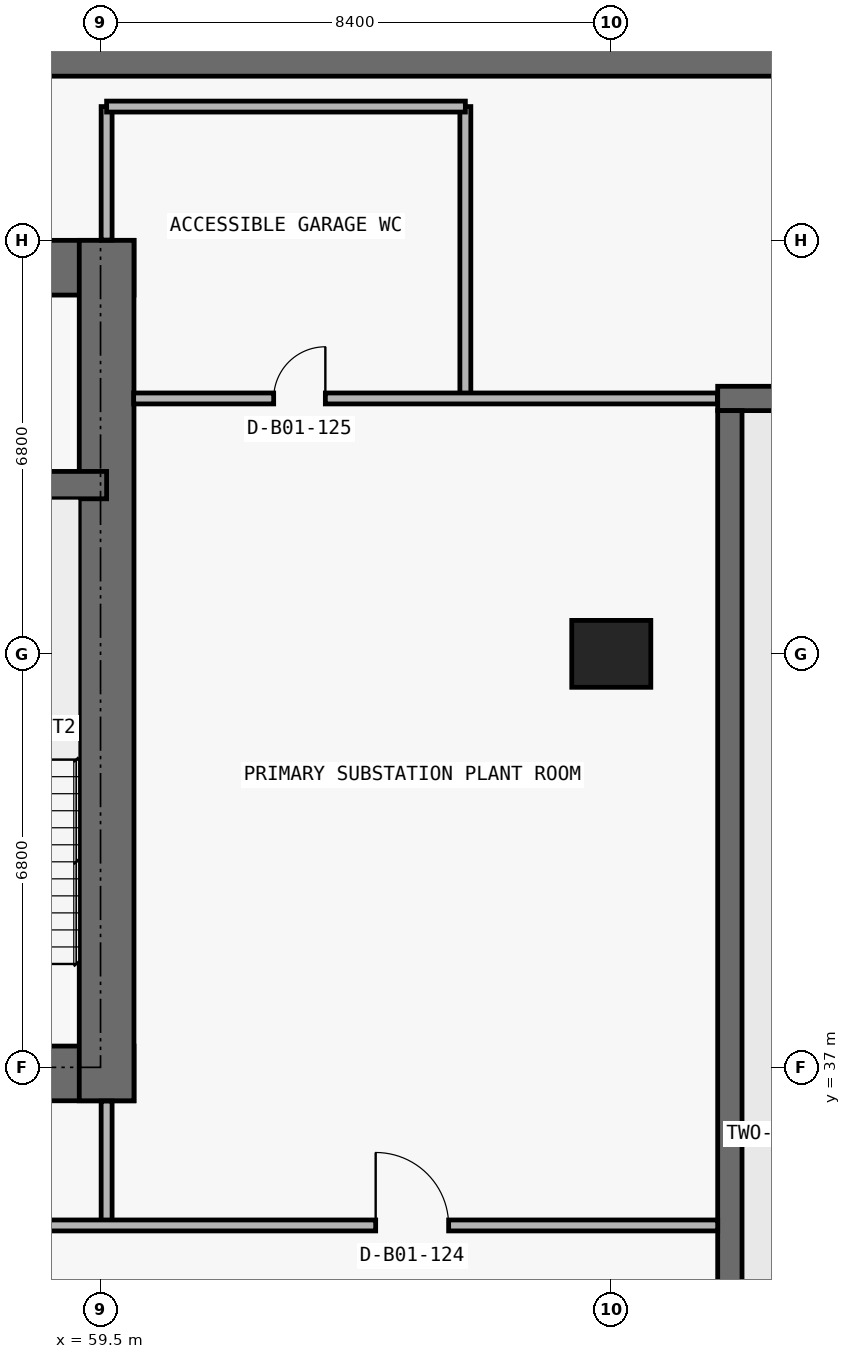
"""IFC4 building model, lengths in metres.
Left out: names, types, materials, properties, quantities, classifications, styles, units other than length and angle.
Written with IfcOpenShell. Run it as: python <this file> out.ifc"""

import sys

from ifc_helpers import new_model, si_unit, direction, frame, frame_2d, origin, origin_2d, place, context, subcontext, project, spatial, rectangle, extrude, element, fill, save


model = new_model("IFC4")
c1 = context("Model", 3, precision=1e-05, world=origin(), true_north=direction((0.0, 1.0)))
c2 = subcontext(c1, "Body", "Model", "MODEL_VIEW")
j1 = project(units=[si_unit("LENGTHUNIT", "METRE"), si_unit("PLANEANGLEUNIT", "RADIAN")], contexts=[c1])
p1 = place(None, origin())
s1 = spatial("IfcSite", under=j1, at=p1, CompositionType="ELEMENT")
p2 = place(p1, origin())
s2 = spatial("IfcBuilding", under=s1, at=p2, CompositionType="ELEMENT")
p3 = place(p2, frame((0.0, 0.0, -4.5)))
s3 = spatial("IfcBuildingStorey", under=s2, at=p3, CompositionType="ELEMENT", Elevation=-4.5)
p4 = place(p3, frame((0.0, 53.55, 0.0), z_axis=(0.0, 0.0, 1.0), x_axis=(1.0, 0.0, 0.0)))
e1 = element("IfcWall", 1, at=p4, inside=s3, PredefinedType="SOLIDWALL", context=c2, shape_type="SweptSolid", body=[
    extrude(rectangle(XDim=77.8, YDim=0.5, at=frame_2d((38.9, 0.0))), origin(), (0.0, 0.0, 1.0), 4.2),
])
p5 = place(p3, frame((69.65, 48.0, 0.0), z_axis=(0.0, 0.0, 1.0), x_axis=(1.0, 0.0, 0.0)))
e2 = element("IfcWall", 2, at=p5, inside=s3, PredefinedType="SHEAR", context=c2, shape_type="SweptSolid", body=[
    extrude(rectangle(XDim=6.4, YDim=0.4, at=frame_2d((3.2, 0.0))), origin(), (0.0, 0.0, 1.0), 4.2),
])
p6 = place(p3, frame((69.85, 23.6, 0.0), z_axis=(0.0, 0.0, 1.0), x_axis=(0.0, 1.0, 0.0)))
e3 = element("IfcWall", 3, at=p6, inside=s3, PredefinedType="SHEAR", context=c2, shape_type="SweptSolid", body=[
    extrude(rectangle(XDim=24.2, YDim=0.4, at=frame_2d((12.1, 0.0))), origin(), (0.0, 0.0, 1.0), 4.2),
])
p7 = place(p3, frame((67.9, 43.8, 0.0), z_axis=(0.0, 0.0, 1.0), x_axis=(1.0, 0.0, 0.0)))
e4 = element("IfcColumn", 4, at=p7, inside=s3, PredefinedType="COLUMN", context=c2, shape_type="SweptSolid", body=[
    extrude(rectangle(XDim=1.3, YDim=1.1, at=origin_2d()), origin(), (0.0, 0.0, 1.0), 4.2),
])
p8 = place(p3, frame((17.75, 36.9, 0.0), z_axis=(0.0, 0.0, 1.0), x_axis=(1.0, 0.0, 0.0)))
e5 = element("IfcWall", 5, at=p8, inside=s3, PredefinedType="SHEAR", context=c2, shape_type="SweptSolid", body=[
    extrude(rectangle(XDim=42.3, YDim=0.9, at=frame_2d((21.15, 0.0))), origin(), (0.0, 0.0, 1.0), 4.2),
])
p9 = place(p8, frame((14.55, 0.0, 0.0)))
e6 = element("IfcOpeningElement", 6, at=p9, cuts=e5, PredefinedType="OPENING", context=c2, shape_type="SweptSolid", body=[
    extrude(rectangle(XDim=1.1, YDim=2.15, at=frame_2d((0.55, 1.075))), frame((0.0, 0.46, 0.0), z_axis=(0.0, -1.0, 0.0), x_axis=(1.0, 0.0, 0.0)), (0.0, 0.0, 1.0), 0.92),
])
p10 = place(p8, frame((6.4, 0.0, 0.0)))
e7 = element("IfcOpeningElement", 7, at=p10, cuts=e5, PredefinedType="OPENING", context=c2, shape_type="SweptSolid", body=[
    extrude(rectangle(XDim=1.05, YDim=2.15, at=frame_2d((0.525, 1.075))), frame((0.0, 0.46, 0.0), z_axis=(0.0, -1.0, 0.0), x_axis=(1.0, 0.0, 0.0)), (0.0, 0.0, 1.0), 0.92),
])
p11 = place(p8, frame((34.9, 0.0, 0.0)))
e8 = element("IfcOpeningElement", 8, at=p11, cuts=e5, PredefinedType="OPENING", context=c2, shape_type="SweptSolid", body=[
    extrude(rectangle(XDim=1.05, YDim=2.15, at=frame_2d((0.525, 1.075))), frame((0.0, 0.46, 0.0), z_axis=(0.0, -1.0, 0.0), x_axis=(1.0, 0.0, 0.0)), (0.0, 0.0, 1.0), 0.92),
])
p12 = place(p8, frame((11.012, 0.0, 0.0)))
e9 = element("IfcOpeningElement", 9, at=p12, cuts=e5, PredefinedType="OPENING", context=c2, shape_type="SweptSolid", body=[
    extrude(rectangle(XDim=1.05, YDim=2.15, at=frame_2d((0.525, 1.075))), frame((0.0, 0.46, 0.0), z_axis=(0.0, -1.0, 0.0), x_axis=(1.0, 0.0, 0.0)), (0.0, 0.0, 1.0), 0.92),
])
p13 = place(p8, frame((24.25, 0.0, 0.0)))
e10 = element("IfcOpeningElement", 10, at=p13, cuts=e5, PredefinedType="OPENING", context=c2, shape_type="SweptSolid", body=[
    extrude(rectangle(XDim=1.05, YDim=2.15, at=frame_2d((0.525, 1.075))), frame((0.0, 0.46, 0.0), z_axis=(0.0, -1.0, 0.0), x_axis=(1.0, 0.0, 0.0)), (0.0, 0.0, 1.0), 0.92),
])
p14 = place(p3, frame((17.75, 50.15, 0.0), z_axis=(0.0, 0.0, 1.0), x_axis=(1.0, 0.0, 0.0)))
e11 = element("IfcWall", 11, at=p14, inside=s3, PredefinedType="SHEAR", context=c2, shape_type="SweptSolid", body=[
    extrude(rectangle(XDim=42.3, YDim=0.9, at=frame_2d((21.15, 0.0))), origin(), (0.0, 0.0, 1.0), 4.2),
])
p15 = place(p3, frame((59.6, 36.45, 0.0), z_axis=(0.0, 0.0, 1.0), x_axis=(0.0, 1.0, 0.0)))
e12 = element("IfcWall", 12, at=p15, inside=s3, PredefinedType="SHEAR", context=c2, shape_type="SweptSolid", body=[
    extrude(rectangle(XDim=14.15, YDim=0.9, at=frame_2d((7.075, 0.0))), origin(), (0.0, 0.0, 1.0), 4.2),
])
p16 = place(p3, frame((18.2, 46.575, 0.0), z_axis=(0.0, 0.0, 1.0), x_axis=(1.0, 0.0, 0.0)))
e13 = element("IfcWall", 13, at=p16, inside=s3, PredefinedType="SHEAR", context=c2, shape_type="SweptSolid", body=[
    extrude(rectangle(XDim=41.4, YDim=0.45, at=frame_2d((20.7, 0.0))), origin(), (0.0, 0.0, 1.0), 4.2),
])
p17 = place(p16, frame((7.675, 0.0, 0.0)))
e14 = element("IfcOpeningElement", 14, at=p17, cuts=e13, PredefinedType="OPENING", context=c2, shape_type="SweptSolid", body=[
    extrude(rectangle(XDim=1.05, YDim=2.15, at=frame_2d((0.525, 1.075))), frame((0.0, 0.235, 0.0), z_axis=(0.0, -1.0, 0.0), x_axis=(1.0, 0.0, 0.0)), (0.0, 0.0, 1.0), 0.47),
])
p18 = place(p16, frame((32.725, 0.0, 0.0)))
e15 = element("IfcOpeningElement", 15, at=p18, cuts=e13, PredefinedType="OPENING", context=c2, shape_type="SweptSolid", body=[
    extrude(rectangle(XDim=1.05, YDim=2.15, at=frame_2d((0.525, 1.075))), frame((0.0, 0.235, 0.0), z_axis=(0.0, -1.0, 0.0), x_axis=(1.0, 0.0, 0.0)), (0.0, 0.0, 1.0), 0.47),
])
p19 = place(p3, frame((59.6, 34.4, 0.0), z_axis=(0.0, 0.0, 1.0), x_axis=(0.0, 1.0, 0.0)))
e16 = element("IfcWall", 16, at=p19, inside=s3, PredefinedType="PARTITIONING", context=c2, shape_type="SweptSolid", body=[
    extrude(rectangle(XDim=2.045, YDim=0.18, at=frame_2d((1.022, 0.0))), origin(), (0.0, 0.0, 1.0), 3.085),
])
p20 = place(p3, frame((59.6, 50.605, 0.0), z_axis=(0.0, 0.0, 1.0), x_axis=(0.0, 1.0, 0.0)))
e17 = element("IfcWall", 17, at=p20, inside=s3, PredefinedType="PARTITIONING", context=c2, shape_type="SweptSolid", body=[
    extrude(rectangle(XDim=2.195, YDim=0.18, at=frame_2d((1.098, 0.0))), origin(), (0.0, 0.0, 1.0), 4.2),
])
p21 = place(p3, frame((65.5, 48.0, 0.0), z_axis=(0.0, 0.0, 1.0), x_axis=(0.0, 1.0, 0.0)))
e18 = element("IfcWall", 18, at=p21, inside=s3, PredefinedType="PARTITIONING", context=c2, shape_type="SweptSolid", body=[
    extrude(rectangle(XDim=4.8, YDim=0.18, at=frame_2d((2.4, 0.0))), origin(), (0.0, 0.0, 1.0), 4.2),
])
p22 = place(p3, frame((8.15, 34.4, 0.0), z_axis=(0.0, 0.0, 1.0), x_axis=(1.0, 0.0, 0.0)))
e19 = element("IfcWall", 19, at=p22, inside=s3, PredefinedType="PARTITIONING", context=c2, shape_type="SweptSolid", body=[
    extrude(rectangle(XDim=61.5, YDim=0.18, at=frame_2d((30.75, 0.0))), origin(), (0.0, 0.0, 1.0), 4.2),
])
p23 = place(p22, frame((30.15, 0.0, 0.0)))
e20 = element("IfcOpeningElement", 20, at=p23, cuts=e19, PredefinedType="OPENING", context=c2, shape_type="SweptSolid", body=[
    extrude(rectangle(XDim=1.2, YDim=2.2, at=frame_2d((0.6, 1.1))), frame((0.0, 0.1, 0.0), z_axis=(0.0, -1.0, 0.0), x_axis=(1.0, 0.0, 0.0)), (0.0, 0.0, 1.0), 0.2),
])
p24 = place(p22, frame((4.425, 0.0, 0.0)))
e21 = element("IfcOpeningElement", 21, at=p24, cuts=e19, PredefinedType="OPENING", context=c2, shape_type="SweptSolid", body=[
    extrude(rectangle(XDim=1.2, YDim=2.2, at=frame_2d((0.6, 1.1))), frame((0.0, 0.1, 0.0), z_axis=(0.0, -1.0, 0.0), x_axis=(1.0, 0.0, 0.0)), (0.0, 0.0, 1.0), 0.2),
])
p25 = place(p22, frame((55.875, 0.0, 0.0)))
e22 = element("IfcOpeningElement", 22, at=p25, cuts=e19, PredefinedType="OPENING", context=c2, shape_type="SweptSolid", body=[
    extrude(rectangle(XDim=1.2, YDim=2.2, at=frame_2d((0.6, 1.1))), frame((0.0, 0.1, 0.0), z_axis=(0.0, -1.0, 0.0), x_axis=(1.0, 0.0, 0.0)), (0.0, 0.0, 1.0), 0.2),
])
p26 = place(p3, frame((60.045, 48.0, 0.0), z_axis=(0.0, 0.0, 1.0), x_axis=(1.0, 0.0, 0.0)))
e23 = element("IfcWall", 23, at=p26, inside=s3, PredefinedType="PARTITIONING", context=c2, shape_type="SweptSolid", body=[
    extrude(rectangle(XDim=9.6, YDim=0.18, at=frame_2d((4.8, 0.0))), origin(), (0.0, 0.0, 1.0), 4.2),
])
p27 = place(p26, frame((2.302, 0.0, 0.0)))
e24 = element("IfcOpeningElement", 24, at=p27, cuts=e23, PredefinedType="OPENING", context=c2, shape_type="SweptSolid", body=[
    extrude(rectangle(XDim=0.85, YDim=2.1, at=frame_2d((0.425, 1.05))), frame((0.0, 0.1, 0.0), z_axis=(0.0, -1.0, 0.0), x_axis=(1.0, 0.0, 0.0)), (0.0, 0.0, 1.0), 0.2),
])
p28 = place(p3, frame((59.6, 52.8, 0.0), z_axis=(0.0, 0.0, 1.0), x_axis=(1.0, 0.0, 0.0)))
e25 = element("IfcWall", 25, at=p28, inside=s3, PredefinedType="PARTITIONING", context=c2, shape_type="SweptSolid", body=[
    extrude(rectangle(XDim=5.9, YDim=0.18, at=frame_2d((2.95, 0.0))), origin(), (0.0, 0.0, 1.0), 4.2),
])
p29 = place(p25, origin())
e26 = element("IfcDoor", 26, at=p29, inside=s3, OperationType="SINGLE_SWING_LEFT", PredefinedType="DOOR", context=c2, shape_type="SweptSolid", body=[
    extrude(rectangle(XDim=1.2, YDim=2.2, at=frame_2d((0.6, 1.1))), frame((0.0, 0.025, 0.0), z_axis=(0.0, -1.0, 0.0), x_axis=(1.0, 0.0, 0.0)), (0.0, 0.0, 1.0), 0.05),
])
fill(e22, e26)
p30 = place(p27, origin())
e27 = element("IfcDoor", 27, at=p30, inside=s3, OperationType="SINGLE_SWING_RIGHT", PredefinedType="DOOR", context=c2, shape_type="SweptSolid", body=[
    extrude(rectangle(XDim=0.85, YDim=2.1, at=frame_2d((0.425, 1.05))), frame((0.0, 0.025, 0.0), z_axis=(0.0, -1.0, 0.0), x_axis=(1.0, 0.0, 0.0)), (0.0, 0.0, 1.0), 0.05),
])
fill(e24, e27)
save(model, sys.argv[1])
